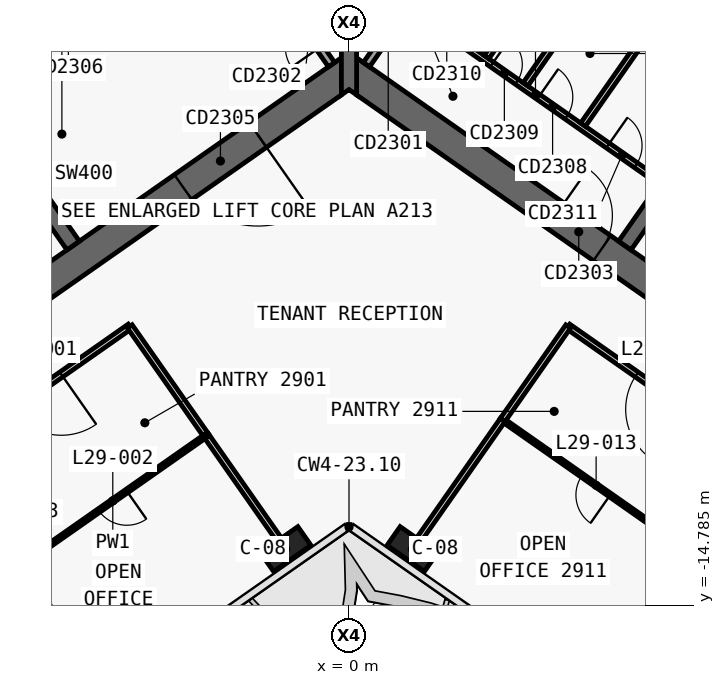
"""IFC4 building model, lengths in metres.
Left out: names, types, materials, properties, quantities, classifications, styles, units other than length and angle.
Written with IfcOpenShell. Run it as: python <this file> out.ifc"""

import sys

from ifc_helpers import new_model, si_unit, direction, frame, frame_2d, origin, origin_2d, place, context, subcontext, project, spatial, polyline, rectangle, outline, extrude, element, fill, save


model = new_model("IFC4")
c1 = context("Model", 3, precision=1e-05, world=origin(), true_north=direction((0.0, 1.0)))
c2 = subcontext(c1, "Body", "Model", "MODEL_VIEW")
j1 = project(units=[si_unit("LENGTHUNIT", "METRE"), si_unit("PLANEANGLEUNIT", "RADIAN")], contexts=[c1])
p1 = place(None, origin())
s1 = spatial("IfcSite", under=j1, at=p1, CompositionType="ELEMENT")
p2 = place(p1, origin())
s2 = spatial("IfcBuilding", under=s1, at=p2, CompositionType="ELEMENT")
p3 = place(p2, frame((0.0, 0.0, 132.0)))
s3 = spatial("IfcBuildingStorey", under=s2, at=p3, CompositionType="ELEMENT", Elevation=132.0)
p4 = place(p3, frame((0.029, 11.984, 0.0), z_axis=(0.0, 0.0, 1.0), x_axis=(-0.819151382952, -0.573577380837, 0.0)))
e1 = element("IfcWall", 1, at=p4, inside=s3, PredefinedType="SHEAR", context=c2, shape_type="SweptSolid", body=[
    extrude(outline(polyline([(33.898, 0.4), (0.56, 0.4), (-0.0, -0.4), (33.898, -0.4), (33.898, 0.4)])), origin(), (0.0, 0.0, 1.0), 3.9),
])
p5 = place(p3, frame((0.029, -0.712, 0.0), z_axis=(0.0, 0.0, 1.0), x_axis=(-0.819151758019, -0.573576845187, 0.0)))
e2 = element("IfcWall", 2, at=p5, inside=s3, PredefinedType="SHEAR", context=c2, shape_type="SweptSolid", body=[
    extrude(outline(polyline([(26.616, 0.4), (0.56, 0.4), (-0.0, -0.4), (26.616, -0.4), (26.616, 0.4)])), origin(), (0.0, 0.0, 1.0), 3.9),
])
p6 = place(p5, frame((2.966, 0.0, 0.0)))
e3 = element("IfcOpeningElement", 3, at=p6, cuts=e2, PredefinedType="OPENING", context=c2, shape_type="SweptSolid", body=[
    extrude(rectangle(XDim=2.4, YDim=2.1, at=frame_2d((1.2, 1.05))), frame((0.0, 0.41, 0.0), z_axis=(0.0, -1.0, 0.0), x_axis=(1.0, 0.0, 0.0)), (0.0, 0.0, 1.0), 0.82),
])
p7 = place(p5, frame((11.916, 0.0, 0.0)))
e4 = element("IfcOpeningElement", 4, at=p7, cuts=e2, PredefinedType="OPENING", context=c2, shape_type="SweptSolid", body=[
    extrude(rectangle(XDim=2.4, YDim=2.1, at=frame_2d((1.2, 1.05))), frame((0.0, 0.41, 0.0), z_axis=(0.0, -1.0, 0.0), x_axis=(1.0, 0.0, 0.0)), (0.0, 0.0, 1.0), 0.82),
])
p8 = place(p3, frame((-7.258, -5.326, 0.0), z_axis=(0.0, 0.0, 1.0), x_axis=(-0.573540709186, 0.819177059558, 0.0)))
e5 = element("IfcWall", 5, at=p8, inside=s3, PredefinedType="SHEAR", context=c2, shape_type="SweptSolid", body=[
    extrude(outline(polyline([(4.6, 0.2), (-0.0, 0.2), (-0.0, -0.2), (4.6, -0.2), (4.6, 0.2)])), origin(), (0.0, 0.0, 1.0), 3.9),
])
p9 = place(p3, frame((-2.638, 3.768, 0.0), z_axis=(0.0, 0.0, 1.0), x_axis=(-0.81915267502, -0.573575535572, 0.0)))
e6 = element("IfcWall", 6, at=p9, inside=s3, PredefinedType="SHEAR", context=c2, shape_type="SweptSolid", body=[
    extrude(outline(polyline([(26.2, 0.2), (0.0, 0.2), (0.0, -0.2), (26.2, -0.2), (26.2, 0.2)])), origin(), (0.0, 0.0, 1.0), 3.9),
])
p10 = place(p9, frame((1.169, 0.0, 0.0)))
e7 = element("IfcOpeningElement", 7, at=p10, cuts=e6, PredefinedType="OPENING", context=c2, shape_type="SweptSolid", body=[
    extrude(rectangle(XDim=1.1, YDim=2.1, at=frame_2d((0.55, 1.05))), frame((0.0, 0.21, 0.0), z_axis=(0.0, -1.0, 0.0), x_axis=(1.0, 0.0, 0.0)), (0.0, 0.0, 1.0), 0.42),
])
p11 = place(p9, frame((3.206, 0.0, 0.0)))
e8 = element("IfcOpeningElement", 8, at=p11, cuts=e6, PredefinedType="OPENING", context=c2, shape_type="SweptSolid", body=[
    extrude(rectangle(XDim=1.1, YDim=2.1, at=frame_2d((0.55, 1.05))), frame((0.0, 0.21, 0.0), z_axis=(0.0, -1.0, 0.0), x_axis=(1.0, 0.0, 0.0)), (0.0, 0.0, 1.0), 0.42),
])
p12 = place(p9, frame((5.244, 0.0, 0.0)))
e9 = element("IfcOpeningElement", 9, at=p12, cuts=e6, PredefinedType="OPENING", context=c2, shape_type="SweptSolid", body=[
    extrude(rectangle(XDim=1.1, YDim=2.1, at=frame_2d((0.55, 1.05))), frame((0.0, 0.21, 0.0), z_axis=(0.0, -1.0, 0.0), x_axis=(1.0, 0.0, 0.0)), (0.0, 0.0, 1.0), 0.42),
])
p13 = place(p9, frame((7.281, 0.0, 0.0)))
e10 = element("IfcOpeningElement", 10, at=p13, cuts=e6, PredefinedType="OPENING", context=c2, shape_type="SweptSolid", body=[
    extrude(rectangle(XDim=1.1, YDim=2.1, at=frame_2d((0.55, 1.05))), frame((0.0, 0.21, 0.0), z_axis=(0.0, -1.0, 0.0), x_axis=(1.0, 0.0, 0.0)), (0.0, 0.0, 1.0), 0.42),
])
p14 = place(p9, frame((9.688, 0.0, 0.0)))
e11 = element("IfcOpeningElement", 11, at=p14, cuts=e6, PredefinedType="OPENING", context=c2, shape_type="SweptSolid", body=[
    extrude(rectangle(XDim=1.1, YDim=2.1, at=frame_2d((0.55, 1.05))), frame((0.0, 0.21, 0.0), z_axis=(0.0, -1.0, 0.0), x_axis=(1.0, 0.0, 0.0)), (0.0, 0.0, 1.0), 0.42),
])
p15 = place(p9, frame((11.863, 0.0, 0.0)))
e12 = element("IfcOpeningElement", 12, at=p15, cuts=e6, PredefinedType="OPENING", context=c2, shape_type="SweptSolid", body=[
    extrude(rectangle(XDim=1.1, YDim=2.1, at=frame_2d((0.55, 1.05))), frame((0.0, 0.21, 0.0), z_axis=(0.0, -1.0, 0.0), x_axis=(1.0, 0.0, 0.0)), (0.0, 0.0, 1.0), 0.42),
])
p16 = place(p9, frame((14.038, 0.0, 0.0)))
e13 = element("IfcOpeningElement", 13, at=p16, cuts=e6, PredefinedType="OPENING", context=c2, shape_type="SweptSolid", body=[
    extrude(rectangle(XDim=1.1, YDim=2.1, at=frame_2d((0.55, 1.05))), frame((0.0, 0.21, 0.0), z_axis=(0.0, -1.0, 0.0), x_axis=(1.0, 0.0, 0.0)), (0.0, 0.0, 1.0), 0.42),
])
p17 = place(p9, frame((16.212, 0.0, 0.0)))
e14 = element("IfcOpeningElement", 14, at=p17, cuts=e6, PredefinedType="OPENING", context=c2, shape_type="SweptSolid", body=[
    extrude(rectangle(XDim=1.1, YDim=2.1, at=frame_2d((0.55, 1.05))), frame((0.0, 0.21, 0.0), z_axis=(0.0, -1.0, 0.0), x_axis=(1.0, 0.0, 0.0)), (0.0, 0.0, 1.0), 0.42),
])
p18 = place(p3, frame((-0.029, 11.984, 0.0), z_axis=(0.0, 0.0, 1.0), x_axis=(0.819151382952, -0.573577380837, 0.0)))
e15 = element("IfcWall", 15, at=p18, inside=s3, PredefinedType="SHEAR", context=c2, shape_type="SweptSolid", body=[
    extrude(outline(polyline([(33.898, 0.4), (-0.0, 0.4), (0.56, -0.4), (33.898, -0.4), (33.898, 0.4)])), origin(), (0.0, 0.0, 1.0), 3.9),
])
p19 = place(p3, frame((-0.029, -0.712, 0.0), z_axis=(0.0, 0.0, 1.0), x_axis=(0.819151758019, -0.573576845187, 0.0)))
e16 = element("IfcWall", 16, at=p19, inside=s3, PredefinedType="SHEAR", context=c2, shape_type="SweptSolid", body=[
    extrude(outline(polyline([(26.616, 0.4), (-0.0, 0.4), (0.56, -0.4), (26.616, -0.4), (26.616, 0.4)])), origin(), (0.0, 0.0, 1.0), 3.9),
])
p20 = place(p19, frame((6.666, 0.0, 0.0)))
e17 = element("IfcOpeningElement", 17, at=p20, cuts=e16, PredefinedType="OPENING", context=c2, shape_type="SweptSolid", body=[
    extrude(rectangle(XDim=1.5, YDim=2.1, at=frame_2d((0.75, 1.05))), frame((0.0, 0.41, 0.0), z_axis=(0.0, -1.0, 0.0), x_axis=(1.0, 0.0, 0.0)), (0.0, 0.0, 1.0), 0.82),
])
p21 = place(p19, frame((12.366, 0.0, 0.0)))
e18 = element("IfcOpeningElement", 18, at=p21, cuts=e16, PredefinedType="OPENING", context=c2, shape_type="SweptSolid", body=[
    extrude(rectangle(XDim=1.5, YDim=2.1, at=frame_2d((0.75, 1.05))), frame((0.0, 0.41, 0.0), z_axis=(0.0, -1.0, 0.0), x_axis=(1.0, 0.0, 0.0)), (0.0, 0.0, 1.0), 0.82),
])
p22 = place(p3, frame((7.258, -5.326, 0.0), z_axis=(0.0, 0.0, 1.0), x_axis=(0.573540709186, 0.819177059558, 0.0)))
e19 = element("IfcWall", 19, at=p22, inside=s3, PredefinedType="SHEAR", context=c2, shape_type="SweptSolid", body=[
    extrude(outline(polyline([(-0.0, 0.2), (-0.0, -0.2), (4.6, -0.2), (4.6, 0.2), (-0.0, 0.2)])), origin(), (0.0, 0.0, 1.0), 3.9),
])
p23 = place(p3, frame((2.638, 3.768, 0.0), z_axis=(0.0, 0.0, 1.0), x_axis=(0.81915267502, -0.573575535572, 0.0)))
e20 = element("IfcWall", 20, at=p23, inside=s3, PredefinedType="SHEAR", context=c2, shape_type="SweptSolid", body=[
    extrude(outline(polyline([(0.0, 0.2), (0.0, -0.2), (26.2, -0.2), (26.2, 0.2), (0.0, 0.2)])), origin(), (0.0, 0.0, 1.0), 3.9),
])
p24 = place(p23, frame((9.637, 0.0, 0.0)))
e21 = element("IfcOpeningElement", 21, at=p24, cuts=e20, PredefinedType="OPENING", context=c2, shape_type="SweptSolid", body=[
    extrude(rectangle(XDim=1.2, YDim=2.1, at=frame_2d((0.6, 1.05))), frame((0.0, 0.21, 0.0), z_axis=(0.0, -1.0, 0.0), x_axis=(1.0, 0.0, 0.0)), (0.0, 0.0, 1.0), 0.42),
])
p25 = place(p23, frame((11.812, 0.0, 0.0)))
e22 = element("IfcOpeningElement", 22, at=p25, cuts=e20, PredefinedType="OPENING", context=c2, shape_type="SweptSolid", body=[
    extrude(rectangle(XDim=1.2, YDim=2.1, at=frame_2d((0.6, 1.05))), frame((0.0, 0.21, 0.0), z_axis=(0.0, -1.0, 0.0), x_axis=(1.0, 0.0, 0.0)), (0.0, 0.0, 1.0), 0.42),
])
p26 = place(p23, frame((13.988, 0.0, 0.0)))
e23 = element("IfcOpeningElement", 23, at=p26, cuts=e20, PredefinedType="OPENING", context=c2, shape_type="SweptSolid", body=[
    extrude(rectangle(XDim=1.2, YDim=2.1, at=frame_2d((0.6, 1.05))), frame((0.0, 0.21, 0.0), z_axis=(0.0, -1.0, 0.0), x_axis=(1.0, 0.0, 0.0)), (0.0, 0.0, 1.0), 0.42),
])
p27 = place(p23, frame((16.262, 0.0, 0.0)))
e24 = element("IfcOpeningElement", 24, at=p27, cuts=e20, PredefinedType="OPENING", context=c2, shape_type="SweptSolid", body=[
    extrude(rectangle(XDim=1.0, YDim=2.1, at=frame_2d((0.5, 1.05))), frame((0.0, 0.21, 0.0), z_axis=(0.0, -1.0, 0.0), x_axis=(1.0, 0.0, 0.0)), (0.0, 0.0, 1.0), 0.42),
])
p28 = place(p3, frame((0.0, -1.361, 0.0), z_axis=(0.0, 0.0, 1.0), x_axis=(0.0, 1.0, 0.0)))
e25 = element("IfcWall", 25, at=p28, inside=s3, PredefinedType="SHEAR", context=c2, shape_type="SweptSolid", body=[
    extrude(outline(polyline([(0.0, -0.2), (0.14, -0.2), (1.075, -0.2), (12.696, -0.2), (13.813, -0.2), (13.893, -0.2), (13.933, -0.172), (13.813, 0.0), (13.933, 0.172), (13.893, 0.2), (13.813, 0.2), (12.696, 0.2), (1.075, 0.2), (0.14, 0.2), (0.0, 0.2), (0.14, 0.0), (0.0, -0.2)])), origin(), (0.0, 0.0, 1.0), 3.9),
])
for number, where, z_axis, x_axis in (
    (26, (-1.665, -13.313, 0.0), (0.0, 0.0, 1.0), (-0.819, -0.574, 0.0)),
    (27, (1.665, -13.313, 0.0), (0.0, 0.0, 1.0), (0.819, -0.574, 0.0)),
):
    element("IfcColumn", number, at=place(p3, frame(where, z_axis=z_axis, x_axis=x_axis)), inside=s3, PredefinedType="COLUMN", context=c2, shape_type="SweptSolid", body=[
        extrude(rectangle(XDim=1.2, YDim=0.6, at=origin_2d()), origin(), (0.0, 0.0, 1.0), 3.9),
    ])
p29 = place(p3, frame((1.63, 0.934, 0.0), z_axis=(0.0, 0.0, 1.0), x_axis=(0.819165963305, -0.573556557423, 0.0)))
e28 = element("IfcWall", 28, at=p29, inside=s3, PredefinedType="PARTITIONING", context=c2, shape_type="SweptSolid", body=[
    extrude(rectangle(XDim=8.0, YDim=0.15, at=frame_2d((4.0, 0.0))), origin(), (0.0, 0.0, 1.0), 3.62),
])
p30 = place(p29, frame((0.7, 0.0, 0.0)))
e29 = element("IfcOpeningElement", 29, at=p30, cuts=e28, PredefinedType="OPENING", context=c2, shape_type="SweptSolid", body=[
    extrude(rectangle(XDim=0.9, YDim=2.1, at=frame_2d((0.45, 1.05))), frame((0.0, 0.085, 0.0), z_axis=(0.0, -1.0, 0.0), x_axis=(1.0, 0.0, 0.0)), (0.0, 0.0, 1.0), 0.17),
])
p31 = place(p29, frame((2.6, 0.0, 0.0)))
e30 = element("IfcOpeningElement", 30, at=p31, cuts=e28, PredefinedType="OPENING", context=c2, shape_type="SweptSolid", body=[
    extrude(rectangle(XDim=0.8, YDim=2.1, at=frame_2d((0.4, 1.05))), frame((0.0, 0.085, 0.0), z_axis=(0.0, -1.0, 0.0), x_axis=(1.0, 0.0, 0.0)), (0.0, 0.0, 1.0), 0.17),
])
p32 = place(p29, frame((4.1, 0.0, 0.0)))
e31 = element("IfcOpeningElement", 31, at=p32, cuts=e28, PredefinedType="OPENING", context=c2, shape_type="SweptSolid", body=[
    extrude(rectangle(XDim=0.9, YDim=2.1, at=frame_2d((0.45, 1.05))), frame((0.0, 0.085, 0.0), z_axis=(0.0, -1.0, 0.0), x_axis=(1.0, 0.0, 0.0)), (0.0, 0.0, 1.0), 0.17),
])
p33 = place(p29, frame((6.325, 0.0, 0.0)))
e32 = element("IfcOpeningElement", 32, at=p33, cuts=e28, PredefinedType="OPENING", context=c2, shape_type="SweptSolid", body=[
    extrude(rectangle(XDim=0.9, YDim=2.1, at=frame_2d((0.45, 1.05))), frame((0.0, 0.085, 0.0), z_axis=(0.0, -1.0, 0.0), x_axis=(1.0, 0.0, 0.0)), (0.0, 0.0, 1.0), 0.17),
])
for number, where, z_axis, x_axis in (
    (33, (3.619, -0.367, 0.0), (0.0, 0.0, 1.0), (0.574, 0.819, 0.0)),
    (34, (4.643, -1.084, 0.0), (0.0, 0.0, 1.0), (0.574, 0.819, 0.0)),
    (35, (6.158, -2.145, 0.0), (0.0, 0.0, 1.0), (0.574, 0.819, 0.0)),
):
    element("IfcWall", number, at=place(p3, frame(where, z_axis=z_axis, x_axis=x_axis)), inside=s3, PredefinedType="PARTITIONING", context=c2, shape_type="SweptSolid", body=[
        extrude(rectangle(XDim=2.625, YDim=0.15, at=frame_2d((1.312, 0.0))), origin(), (0.0, 0.0, 1.0), 3.62),
    ])
p34 = place(p3, frame((-0.459, -0.565, 0.0), z_axis=(0.0, 0.0, 1.0), x_axis=(-0.573576324356, 0.819152122709, 0.0)))
e36 = element("IfcWall", 36, at=p34, inside=s3, PredefinedType="SOLIDWALL", context=c2, shape_type="SweptSolid", body=[
    extrude(rectangle(XDim=4.6, YDim=0.2, at=frame_2d((2.3, 0.0))), origin(), (0.0, 0.0, 1.0), 3.62),
])
p35 = place(p34, frame((0.55, 0.0, 0.0)))
e37 = element("IfcOpeningElement", 37, at=p35, cuts=e36, PredefinedType="OPENING", context=c2, shape_type="SweptSolid", body=[
    extrude(rectangle(XDim=0.9, YDim=2.1, at=frame_2d((0.45, 1.05))), frame((0.0, 0.11, 0.0), z_axis=(0.0, -1.0, 0.0), x_axis=(1.0, 0.0, 0.0)), (0.0, 0.0, 1.0), 0.22),
])
p36 = place(p3, frame((0.459, -0.565, 0.0), z_axis=(0.0, 0.0, 1.0), x_axis=(0.573576324356, 0.819152122709, 0.0)))
e38 = element("IfcWall", 38, at=p36, inside=s3, PredefinedType="SOLIDWALL", context=c2, shape_type="SweptSolid", body=[
    extrude(rectangle(XDim=4.6, YDim=0.2, at=frame_2d((2.3, 0.0))), origin(), (0.0, 0.0, 1.0), 3.62),
])
p37 = place(p36, frame((0.55, 0.0, 0.0)))
e39 = element("IfcOpeningElement", 39, at=p37, cuts=e38, PredefinedType="OPENING", context=c2, shape_type="SweptSolid", body=[
    extrude(rectangle(XDim=0.9, YDim=2.1, at=frame_2d((0.45, 1.05))), frame((0.0, 0.11, 0.0), z_axis=(0.0, -1.0, 0.0), x_axis=(1.0, 0.0, 0.0)), (0.0, 0.0, 1.0), 0.22),
])
p38 = place(p3, frame((10.683, -10.898, 0.0), z_axis=(0.0, 0.0, 1.0), x_axis=(-0.819180321071, 0.573536050802, 0.0)))
e40 = element("IfcWall", 40, at=p38, inside=s3, PredefinedType="PARTITIONING", context=c2, shape_type="SweptSolid", body=[
    extrude(rectangle(XDim=6.002, YDim=0.15, at=frame_2d((3.001, 0.0))), origin(), (0.0, 0.0, 1.0), 3.0),
])
p39 = place(p38, frame((2.201, 0.0, 0.0)))
e41 = element("IfcOpeningElement", 41, at=p39, cuts=e40, PredefinedType="OPENING", context=c2, shape_type="SweptSolid", body=[
    extrude(rectangle(XDim=1.6, YDim=2.1, at=frame_2d((0.8, 1.05))), frame((0.0, 0.085, 0.0), z_axis=(0.0, -1.0, 0.0), x_axis=(1.0, 0.0, 0.0)), (0.0, 0.0, 1.0), 0.17),
])
p40 = place(p3, frame((-5.766, -7.456, 0.0), z_axis=(0.0, 0.0, 1.0), x_axis=(-0.819147828287, -0.573582457378, 0.0)))
e42 = element("IfcWall", 42, at=p40, inside=s3, PredefinedType="PARTITIONING", context=c2, shape_type="SweptSolid", body=[
    extrude(rectangle(XDim=6.002, YDim=0.15, at=frame_2d((3.001, 0.0))), origin(), (0.0, 0.0, 1.0), 3.0),
])
p41 = place(p40, frame((2.201, 0.0, 0.0)))
e43 = element("IfcOpeningElement", 43, at=p41, cuts=e42, PredefinedType="OPENING", context=c2, shape_type="SweptSolid", body=[
    extrude(rectangle(XDim=1.6, YDim=2.1, at=frame_2d((0.8, 1.05))), frame((0.0, 0.085, 0.0), z_axis=(0.0, -1.0, 0.0), x_axis=(1.0, 0.0, 0.0)), (0.0, 0.0, 1.0), 0.17),
])
p42 = place(p3, frame((8.96, -13.355, 0.0), z_axis=(0.0, 0.0, 1.0), x_axis=(-0.819149710902, 0.573579768758, 0.0)))
e44 = element("IfcWall", 44, at=p42, inside=s3, PredefinedType="PARTITIONING", context=c2, shape_type="SweptSolid", body=[
    extrude(rectangle(XDim=6.0, YDim=0.1, at=frame_2d((3.0, 0.0))), origin(), (0.0, 0.0, 1.0), 3.0),
])
p43 = place(p42, frame((2.55, 0.0, 0.0)))
e45 = element("IfcOpeningElement", 45, at=p43, cuts=e44, PredefinedType="OPENING", context=c2, shape_type="SweptSolid", body=[
    extrude(rectangle(XDim=0.9, YDim=2.1, at=frame_2d((0.45, 1.05))), frame((0.0, 0.06, 0.0), z_axis=(0.0, -1.0, 0.0), x_axis=(1.0, 0.0, 0.0)), (0.0, 0.0, 1.0), 0.12),
])
p44 = place(p3, frame((8.101, -14.583, 0.0), z_axis=(0.0, 0.0, 1.0), x_axis=(-0.573516940352, -0.819193700616, 0.0)))
e46 = element("IfcWall", 46, at=p44, inside=s3, PredefinedType="PARTITIONING", context=c2, shape_type="SweptSolid", body=[
    extrude(rectangle(XDim=3.001, YDim=0.15, at=frame_2d((1.5, 0.0))), origin(), (0.0, 0.0, 1.0), 2.9),
])
p45 = place(p3, frame((1.849, -13.051, 0.0), z_axis=(0.0, 0.0, 1.0), x_axis=(0.573594994199, 0.819139049631, 0.0)))
e47 = element("IfcWall", 47, at=p45, inside=s3, PredefinedType="PARTITIONING", context=c2, shape_type="SweptSolid", body=[
    extrude(rectangle(XDim=3.829, YDim=0.15, at=frame_2d((1.915, 0.0))), origin(), (0.0, 0.0, 1.0), 3.0),
])
p46 = place(p3, frame((4.046, -9.913, 0.0), z_axis=(0.0, 0.0, 1.0), x_axis=(0.573560650686, 0.819163097304, 0.0)))
e48 = element("IfcWall", 48, at=p46, inside=s3, PredefinedType="PARTITIONING", context=c2, shape_type="SweptSolid", body=[
    extrude(rectangle(XDim=3.0, YDim=0.15, at=frame_2d((1.5, 0.0))), origin(), (0.0, 0.0, 1.0), 3.0),
])
p47 = place(p3, frame((-1.849, -13.051, 0.0), z_axis=(0.0, 0.0, 1.0), x_axis=(-0.573600070244, 0.819135495151, 0.0)))
e49 = element("IfcWall", 49, at=p47, inside=s3, PredefinedType="PARTITIONING", context=c2, shape_type="SweptSolid", body=[
    extrude(rectangle(XDim=3.331, YDim=0.15, at=frame_2d((1.666, 0.0))), origin(), (0.0, 0.0, 1.0), 3.0),
])
p48 = place(p3, frame((-3.758, -10.324, 0.0), z_axis=(0.0, 0.0, 1.0), x_axis=(-0.573560539213, 0.819163175355, 0.0)))
e50 = element("IfcWall", 50, at=p48, inside=s3, PredefinedType="PARTITIONING", context=c2, shape_type="SweptSolid", body=[
    extrude(rectangle(XDim=3.504, YDim=0.15, at=frame_2d((1.752, 0.0))), origin(), (0.0, 0.0, 1.0), 3.0),
])
p49 = place(p3, frame((-3.758, -10.324, 0.0), z_axis=(0.0, 0.0, 1.0), x_axis=(-0.819149710902, -0.573579768758, 0.0)))
e51 = element("IfcWall", 51, at=p49, inside=s3, PredefinedType="PARTITIONING", context=c2, shape_type="SweptSolid", body=[
    extrude(rectangle(XDim=6.0, YDim=0.1, at=frame_2d((3.0, 0.0))), origin(), (0.0, 0.0, 1.0), 3.0),
])
p50 = place(p49, frame((2.55, 0.0, 0.0)))
e52 = element("IfcOpeningElement", 52, at=p50, cuts=e51, PredefinedType="OPENING", context=c2, shape_type="SweptSolid", body=[
    extrude(rectangle(XDim=0.9, YDim=2.1, at=frame_2d((0.45, 1.05))), frame((0.0, 0.06, 0.0), z_axis=(0.0, -1.0, 0.0), x_axis=(1.0, 0.0, 0.0)), (0.0, 0.0, 1.0), 0.12),
])
p51 = place(p3, frame((-6.379, -17.041, 0.0), z_axis=(0.0, 0.0, 1.0), x_axis=(-0.573560675104, 0.819163080207, 0.0)))
e53 = element("IfcWall", 53, at=p51, inside=s3, PredefinedType="PARTITIONING", context=c2, shape_type="SweptSolid", body=[
    extrude(rectangle(XDim=3.999, YDim=0.15, at=frame_2d((2.0, 0.0))), origin(), (0.0, 0.0, 1.0), 2.9),
])
p52 = place(p6, origin())
e54 = element("IfcDoor", 54, at=p52, inside=s3, OperationType="DOUBLE_DOOR_SINGLE_SWING", PredefinedType="DOOR", context=c2, shape_type="SweptSolid", body=[
    extrude(rectangle(XDim=2.4, YDim=2.1, at=frame_2d((1.2, 1.05))), frame((0.0, 0.025, 0.0), z_axis=(0.0, -1.0, 0.0), x_axis=(1.0, 0.0, 0.0)), (0.0, 0.0, 1.0), 0.05),
])
fill(e3, e54)
p53 = place(p31, origin())
e55 = element("IfcDoor", 55, at=p53, inside=s3, OperationType="SINGLE_SWING_RIGHT", PredefinedType="DOOR", context=c2, shape_type="SweptSolid", body=[
    extrude(rectangle(XDim=0.8, YDim=2.1, at=frame_2d((0.4, 1.05))), frame((0.0, 0.025, 0.0), z_axis=(0.0, -1.0, 0.0), x_axis=(1.0, 0.0, 0.0)), (0.0, 0.0, 1.0), 0.05),
])
fill(e30, e55)
p54 = place(p32, origin())
e56 = element("IfcDoor", 56, at=p54, inside=s3, OperationType="SINGLE_SWING_RIGHT", PredefinedType="DOOR", context=c2, shape_type="SweptSolid", body=[
    extrude(rectangle(XDim=0.9, YDim=2.1, at=frame_2d((0.45, 1.05))), frame((0.0, 0.025, 0.0), z_axis=(0.0, -1.0, 0.0), x_axis=(1.0, 0.0, 0.0)), (0.0, 0.0, 1.0), 0.05),
])
fill(e31, e56)
p55 = place(p33, origin())
e57 = element("IfcDoor", 57, at=p55, inside=s3, OperationType="SINGLE_SWING_RIGHT", PredefinedType="DOOR", context=c2, shape_type="SweptSolid", body=[
    extrude(rectangle(XDim=0.9, YDim=2.1, at=frame_2d((0.45, 1.05))), frame((0.0, 0.025, 0.0), z_axis=(0.0, -1.0, 0.0), x_axis=(1.0, 0.0, 0.0)), (0.0, 0.0, 1.0), 0.05),
])
fill(e32, e57)
p56 = place(p20, origin())
e58 = element("IfcDoor", 58, at=p56, inside=s3, OperationType="SINGLE_SWING_RIGHT", PredefinedType="DOOR", context=c2, shape_type="SweptSolid", body=[
    extrude(rectangle(XDim=1.5, YDim=2.1, at=frame_2d((0.75, 1.05))), frame((0.0, 0.025, 0.0), z_axis=(0.0, -1.0, 0.0), x_axis=(1.0, 0.0, 0.0)), (0.0, 0.0, 1.0), 0.05),
])
fill(e17, e58)
p57 = place(p41, origin())
e59 = element("IfcDoor", 59, at=p57, inside=s3, OperationType="DOUBLE_DOOR_SINGLE_SWING", PredefinedType="DOOR", context=c2, shape_type="SweptSolid", body=[
    extrude(rectangle(XDim=1.6, YDim=2.1, at=frame_2d((0.8, 1.05))), frame((0.0, 0.025, 0.0), z_axis=(0.0, -1.0, 0.0), x_axis=(1.0, 0.0, 0.0)), (0.0, 0.0, 1.0), 0.05),
])
fill(e43, e59)
p58 = place(p50, origin())
e60 = element("IfcDoor", 60, at=p58, inside=s3, OperationType="SINGLE_SWING_RIGHT", PredefinedType="DOOR", context=c2, shape_type="SweptSolid", body=[
    extrude(rectangle(XDim=0.9, YDim=2.1, at=frame_2d((0.45, 1.05))), frame((0.0, 0.025, 0.0), z_axis=(0.0, -1.0, 0.0), x_axis=(1.0, 0.0, 0.0)), (0.0, 0.0, 1.0), 0.05),
])
fill(e52, e60)
p59 = place(p39, origin())
e61 = element("IfcDoor", 61, at=p59, inside=s3, OperationType="DOUBLE_DOOR_SINGLE_SWING", PredefinedType="DOOR", context=c2, shape_type="SweptSolid", body=[
    extrude(rectangle(XDim=1.6, YDim=2.1, at=frame_2d((0.8, 1.05))), frame((0.0, 0.025, 0.0), z_axis=(0.0, -1.0, 0.0), x_axis=(1.0, 0.0, 0.0)), (0.0, 0.0, 1.0), 0.05),
])
fill(e41, e61)
p60 = place(p43, origin())
e62 = element("IfcDoor", 62, at=p60, inside=s3, OperationType="SINGLE_SWING_LEFT", PredefinedType="DOOR", context=c2, shape_type="SweptSolid", body=[
    extrude(rectangle(XDim=0.9, YDim=2.1, at=frame_2d((0.45, 1.05))), frame((0.0, 0.025, 0.0), z_axis=(0.0, -1.0, 0.0), x_axis=(1.0, 0.0, 0.0)), (0.0, 0.0, 1.0), 0.05),
])
fill(e45, e62)
save(model, sys.argv[1])
